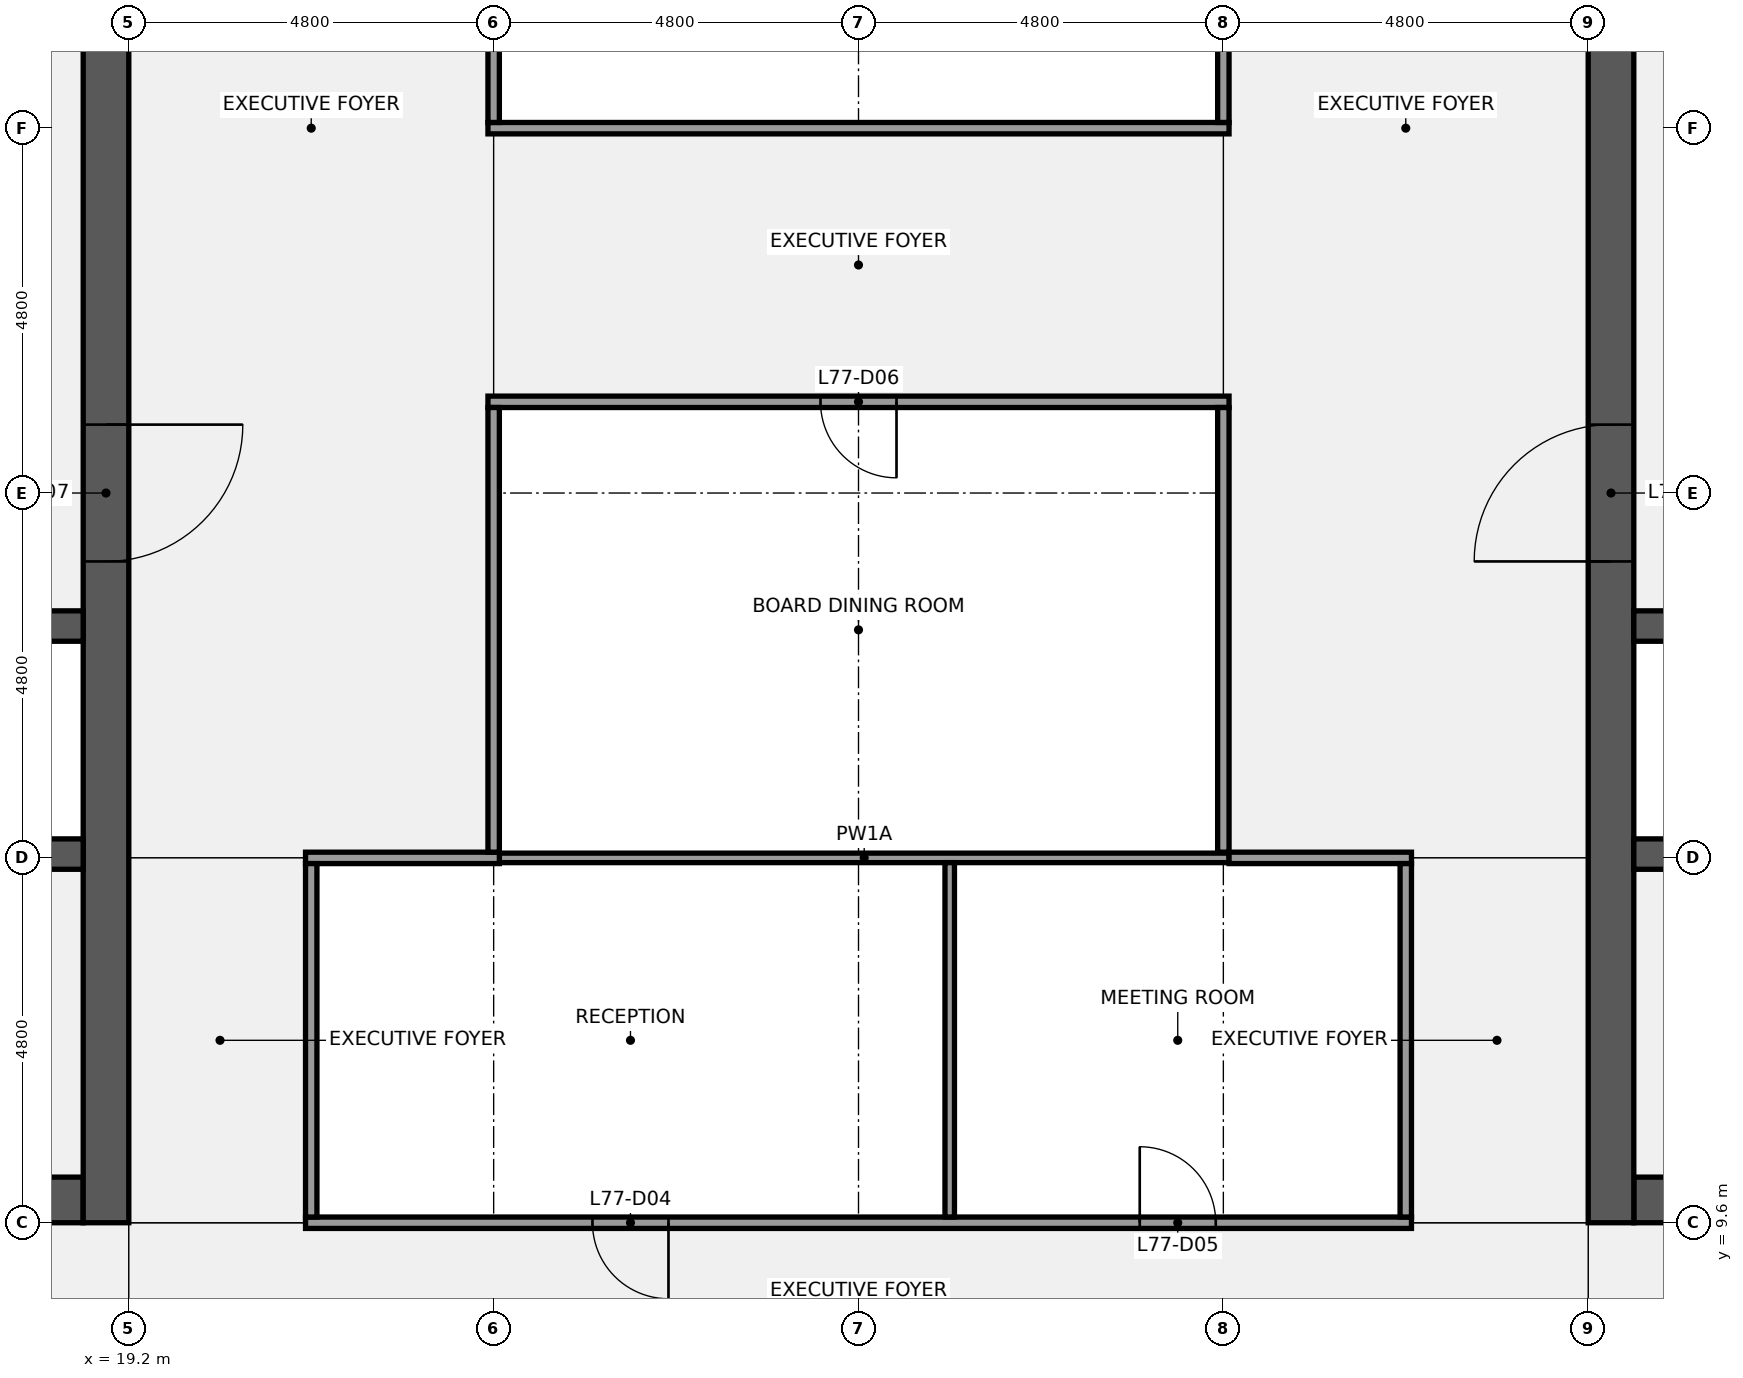
"""IFC4 building model, lengths in metres.
Left out: names, types, materials, properties, quantities, classifications, styles, units other than length and angle.
Written with IfcOpenShell. Run it as: python <this file> out.ifc"""

import sys

from ifc_helpers import new_model, si_unit, direction, frame, frame_2d, origin, place, context, subcontext, project, spatial, rectangle, extrude, element, fill, save


model = new_model("IFC4")
c1 = context("Model", 3, precision=1e-05, world=origin(), true_north=direction((0.0, 1.0)))
c2 = subcontext(c1, "Body", "Model", "MODEL_VIEW")
j1 = project(units=[si_unit("LENGTHUNIT", "METRE"), si_unit("PLANEANGLEUNIT", "RADIAN")], contexts=[c1])
p1 = place(None, origin())
s1 = spatial("IfcSite", under=j1, at=p1, CompositionType="ELEMENT")
p2 = place(p1, origin())
s2 = spatial("IfcBuilding", under=s1, at=p2, CompositionType="ELEMENT")
p3 = place(p2, frame((0.0, 0.0, 346.3)))
s3 = spatial("IfcBuildingStorey", under=s2, at=p3, CompositionType="ELEMENT", Elevation=346.3)
p4 = place(p3, frame((18.6, 9.9, 0.0), z_axis=(0.0, 0.0, 1.0), x_axis=(-1.0, 0.0, 0.0)))
e1 = element("IfcWall", 1, at=p4, inside=s3, PredefinedType="SHEAR", context=c2, shape_type="SweptSolid", body=[
    extrude(rectangle(XDim=4.2, YDim=0.6, at=frame_2d((2.1, 0.0))), origin(), (0.0, 0.0, 1.0), 3.84),
])
p5 = place(p4, frame((1.25, 0.0, 0.0)))
e2 = element("IfcOpeningElement", 2, at=p5, cuts=e1, PredefinedType="OPENING", context=c2, shape_type="SweptSolid", body=[
    extrude(rectangle(XDim=1.1, YDim=2.1, at=frame_2d((0.55, 1.05))), frame((0.0, 0.31, 0.0), z_axis=(0.0, -1.0, 0.0), x_axis=(1.0, 0.0, 0.0)), (0.0, 0.0, 1.0), 0.62),
])
p6 = place(p3, frame((18.9, 38.4, 0.0), z_axis=(0.0, 0.0, 1.0), x_axis=(0.0, -1.0, 0.0)))
e3 = element("IfcWall", 3, at=p6, inside=s3, PredefinedType="SHEAR", context=c2, shape_type="SweptSolid", body=[
    extrude(rectangle(XDim=28.8, YDim=0.6, at=frame_2d((14.4, 0.0))), origin(), (0.0, 0.0, 1.0), 3.84),
])
p7 = place(p6, frame((18.3, 0.0, 0.0)))
e4 = element("IfcOpeningElement", 4, at=p7, cuts=e3, PredefinedType="OPENING", context=c2, shape_type="SweptSolid", body=[
    extrude(rectangle(XDim=1.8, YDim=2.1, at=frame_2d((0.9, 1.05))), frame((0.0, 0.31, 0.0), z_axis=(0.0, -1.0, 0.0), x_axis=(1.0, 0.0, 0.0)), (0.0, 0.0, 1.0), 0.62),
])
p8 = place(p6, frame((8.7, 0.0, 0.0)))
e5 = element("IfcOpeningElement", 5, at=p8, cuts=e3, PredefinedType="OPENING", context=c2, shape_type="SweptSolid", body=[
    extrude(rectangle(XDim=1.8, YDim=2.1, at=frame_2d((0.9, 1.05))), frame((0.0, 0.31, 0.0), z_axis=(0.0, -1.0, 0.0), x_axis=(1.0, 0.0, 0.0)), (0.0, 0.0, 1.0), 0.62),
])
p9 = place(p3, frame((0.6, 14.45, 0.0), z_axis=(0.0, 0.0, 1.0), x_axis=(1.0, 0.0, 0.0)))
e6 = element("IfcWall", 6, at=p9, inside=s3, PredefinedType="SHEAR", context=c2, shape_type="SweptSolid", body=[
    extrude(rectangle(XDim=18.0, YDim=0.4, at=frame_2d((9.0, 0.0))), origin(), (0.0, 0.0, 1.0), 3.84),
])
p10 = place(p3, frame((0.6, 17.45, 0.0), z_axis=(0.0, 0.0, 1.0), x_axis=(1.0, 0.0, 0.0)))
e7 = element("IfcWall", 7, at=p10, inside=s3, PredefinedType="SHEAR", context=c2, shape_type="SweptSolid", body=[
    extrude(rectangle(XDim=18.0, YDim=0.4, at=frame_2d((9.0, 0.0))), origin(), (0.0, 0.0, 1.0), 3.84),
])
p11 = place(p10, frame((3.363, 0.0, 0.0)))
e8 = element("IfcOpeningElement", 8, at=p11, cuts=e7, PredefinedType="OPENING", context=c2, shape_type="SweptSolid", body=[
    extrude(rectangle(XDim=1.0, YDim=2.1, at=frame_2d((0.5, 1.05))), frame((0.0, 0.21, 0.0), z_axis=(0.0, -1.0, 0.0), x_axis=(1.0, 0.0, 0.0)), (0.0, 0.0, 1.0), 0.42),
])
p12 = place(p10, frame((9.1, 0.0, 0.0)))
e9 = element("IfcOpeningElement", 9, at=p12, cuts=e7, PredefinedType="OPENING", context=c2, shape_type="SweptSolid", body=[
    extrude(rectangle(XDim=1.0, YDim=2.1, at=frame_2d((0.5, 1.05))), frame((0.0, 0.21, 0.0), z_axis=(0.0, -1.0, 0.0), x_axis=(1.0, 0.0, 0.0)), (0.0, 0.0, 1.0), 0.42),
])
p13 = place(p10, frame((12.4, 0.0, 0.0)))
e10 = element("IfcOpeningElement", 10, at=p13, cuts=e7, PredefinedType="OPENING", context=c2, shape_type="SweptSolid", body=[
    extrude(rectangle(XDim=1.0, YDim=2.1, at=frame_2d((0.5, 1.05))), frame((0.0, 0.21, 0.0), z_axis=(0.0, -1.0, 0.0), x_axis=(1.0, 0.0, 0.0)), (0.0, 0.0, 1.0), 0.42),
])
p14 = place(p10, frame((15.738, 0.0, 0.0)))
e11 = element("IfcOpeningElement", 11, at=p14, cuts=e7, PredefinedType="OPENING", context=c2, shape_type="SweptSolid", body=[
    extrude(rectangle(XDim=1.0, YDim=2.1, at=frame_2d((0.5, 1.05))), frame((0.0, 0.21, 0.0), z_axis=(0.0, -1.0, 0.0), x_axis=(1.0, 0.0, 0.0)), (0.0, 0.0, 1.0), 0.42),
])
p15 = place(p3, frame((43.2, 9.9, 0.0), z_axis=(0.0, 0.0, 1.0), x_axis=(-1.0, 0.0, 0.0)))
e12 = element("IfcWall", 12, at=p15, inside=s3, PredefinedType="SHEAR", context=c2, shape_type="SweptSolid", body=[
    extrude(rectangle(XDim=4.2, YDim=0.6, at=frame_2d((2.1, 0.0))), origin(), (0.0, 0.0, 1.0), 3.84),
])
p16 = place(p15, frame((1.85, 0.0, 0.0)))
e13 = element("IfcOpeningElement", 13, at=p16, cuts=e12, PredefinedType="OPENING", context=c2, shape_type="SweptSolid", body=[
    extrude(rectangle(XDim=1.1, YDim=2.1, at=frame_2d((0.55, 1.05))), frame((0.0, 0.31, 0.0), z_axis=(0.0, -1.0, 0.0), x_axis=(1.0, 0.0, 0.0)), (0.0, 0.0, 1.0), 0.62),
])
p17 = place(p3, frame((38.7, 9.6, 0.0), z_axis=(0.0, 0.0, 1.0), x_axis=(0.0, 1.0, 0.0)))
e14 = element("IfcWall", 14, at=p17, inside=s3, PredefinedType="SHEAR", context=c2, shape_type="SweptSolid", body=[
    extrude(rectangle(XDim=28.8, YDim=0.6, at=frame_2d((14.4, 0.0))), origin(), (0.0, 0.0, 1.0), 3.84),
])
p18 = place(p17, frame((8.7, 0.0, 0.0)))
e15 = element("IfcOpeningElement", 15, at=p18, cuts=e14, PredefinedType="OPENING", context=c2, shape_type="SweptSolid", body=[
    extrude(rectangle(XDim=1.8, YDim=2.1, at=frame_2d((0.9, 1.05))), frame((0.0, 0.31, 0.0), z_axis=(0.0, -1.0, 0.0), x_axis=(1.0, 0.0, 0.0)), (0.0, 0.0, 1.0), 0.62),
])
p19 = place(p17, frame((18.3, 0.0, 0.0)))
e16 = element("IfcOpeningElement", 16, at=p19, cuts=e14, PredefinedType="OPENING", context=c2, shape_type="SweptSolid", body=[
    extrude(rectangle(XDim=1.8, YDim=2.1, at=frame_2d((0.9, 1.05))), frame((0.0, 0.31, 0.0), z_axis=(0.0, -1.0, 0.0), x_axis=(1.0, 0.0, 0.0)), (0.0, 0.0, 1.0), 0.62),
])
p20 = place(p3, frame((39.0, 14.45, 0.0), z_axis=(0.0, 0.0, 1.0), x_axis=(1.0, 0.0, 0.0)))
e17 = element("IfcWall", 17, at=p20, inside=s3, PredefinedType="SHEAR", context=c2, shape_type="SweptSolid", body=[
    extrude(rectangle(XDim=18.0, YDim=0.4, at=frame_2d((9.0, 0.0))), origin(), (0.0, 0.0, 1.0), 3.84),
])
p21 = place(p3, frame((39.0, 17.45, 0.0), z_axis=(0.0, 0.0, 1.0), x_axis=(1.0, 0.0, 0.0)))
e18 = element("IfcWall", 18, at=p21, inside=s3, PredefinedType="SHEAR", context=c2, shape_type="SweptSolid", body=[
    extrude(rectangle(XDim=18.0, YDim=0.4, at=frame_2d((9.0, 0.0))), origin(), (0.0, 0.0, 1.0), 3.84),
])
p22 = place(p21, frame((13.637, 0.0, 0.0)))
e19 = element("IfcOpeningElement", 19, at=p22, cuts=e18, PredefinedType="OPENING", context=c2, shape_type="SweptSolid", body=[
    extrude(rectangle(XDim=1.0, YDim=2.1, at=frame_2d((0.5, 1.05))), frame((0.0, 0.21, 0.0), z_axis=(0.0, -1.0, 0.0), x_axis=(1.0, 0.0, 0.0)), (0.0, 0.0, 1.0), 0.42),
])
p23 = place(p21, frame((7.9, 0.0, 0.0)))
e20 = element("IfcOpeningElement", 20, at=p23, cuts=e18, PredefinedType="OPENING", context=c2, shape_type="SweptSolid", body=[
    extrude(rectangle(XDim=1.0, YDim=2.1, at=frame_2d((0.5, 1.05))), frame((0.0, 0.21, 0.0), z_axis=(0.0, -1.0, 0.0), x_axis=(1.0, 0.0, 0.0)), (0.0, 0.0, 1.0), 0.42),
])
p24 = place(p21, frame((4.6, 0.0, 0.0)))
e21 = element("IfcOpeningElement", 21, at=p24, cuts=e18, PredefinedType="OPENING", context=c2, shape_type="SweptSolid", body=[
    extrude(rectangle(XDim=1.0, YDim=2.1, at=frame_2d((0.5, 1.05))), frame((0.0, 0.21, 0.0), z_axis=(0.0, -1.0, 0.0), x_axis=(1.0, 0.0, 0.0)), (0.0, 0.0, 1.0), 0.42),
])
p25 = place(p21, frame((1.262, 0.0, 0.0)))
e22 = element("IfcOpeningElement", 22, at=p25, cuts=e18, PredefinedType="OPENING", context=c2, shape_type="SweptSolid", body=[
    extrude(rectangle(XDim=1.0, YDim=2.1, at=frame_2d((0.5, 1.05))), frame((0.0, 0.21, 0.0), z_axis=(0.0, -1.0, 0.0), x_axis=(1.0, 0.0, 0.0)), (0.0, 0.0, 1.0), 0.42),
])
p26 = place(p3, frame((21.525, 9.6, 0.0), z_axis=(0.0, 0.0, 1.0), x_axis=(1.0, 0.0, 0.0)))
e23 = element("IfcWall", 23, at=p26, inside=s3, PredefinedType="PARTITIONING", context=c2, shape_type="SweptSolid", body=[
    extrude(rectangle(XDim=14.55, YDim=0.15, at=frame_2d((7.275, 0.0))), origin(), (0.0, 0.0, 1.0), 2.849),
])
p27 = place(p26, frame((3.775, 0.0, 0.0)))
e24 = element("IfcOpeningElement", 24, at=p27, cuts=e23, PredefinedType="OPENING", context=c2, shape_type="SweptSolid", body=[
    extrude(rectangle(XDim=1.0, YDim=2.1, at=frame_2d((0.5, 1.05))), frame((0.0, 0.085, 0.0), z_axis=(0.0, -1.0, 0.0), x_axis=(1.0, 0.0, 0.0)), (0.0, 0.0, 1.0), 0.17),
])
p28 = place(p26, frame((10.975, 0.0, 0.0)))
e25 = element("IfcOpeningElement", 25, at=p28, cuts=e23, PredefinedType="OPENING", context=c2, shape_type="SweptSolid", body=[
    extrude(rectangle(XDim=1.0, YDim=2.1, at=frame_2d((0.5, 1.05))), frame((0.0, 0.085, 0.0), z_axis=(0.0, -1.0, 0.0), x_axis=(1.0, 0.0, 0.0)), (0.0, 0.0, 1.0), 0.17),
])
p29 = place(p3, frame((24.075, 14.4, 0.0), z_axis=(0.0, 0.0, 1.0), x_axis=(1.0, 0.0, 0.0)))
e26 = element("IfcWall", 26, at=p29, inside=s3, PredefinedType="PARTITIONING", context=c2, shape_type="SweptSolid", body=[
    extrude(rectangle(XDim=9.6, YDim=0.125, at=frame_2d((4.8, 0.0))), origin(), (0.0, 0.0, 1.0), 2.849),
])
p30 = place(p3, frame((21.525, 14.4, 0.0), z_axis=(0.0, 0.0, 1.0), x_axis=(1.0, 0.0, 0.0)))
e27 = element("IfcWall", 27, at=p30, inside=s3, PredefinedType="PARTITIONING", context=c2, shape_type="SweptSolid", body=[
    extrude(rectangle(XDim=2.55, YDim=0.15, at=frame_2d((1.275, 0.0))), origin(), (0.0, 0.0, 1.0), 2.849),
])
p31 = place(p3, frame((33.675, 14.4, 0.0), z_axis=(0.0, 0.0, 1.0), x_axis=(1.0, 0.0, 0.0)))
e28 = element("IfcWall", 28, at=p31, inside=s3, PredefinedType="PARTITIONING", context=c2, shape_type="SweptSolid", body=[
    extrude(rectangle(XDim=2.4, YDim=0.15, at=frame_2d((1.2, 0.0))), origin(), (0.0, 0.0, 1.0), 2.849),
])
p32 = place(p3, frame((23.925, 20.4, 0.0), z_axis=(0.0, 0.0, 1.0), x_axis=(1.0, 0.0, 0.0)))
e29 = element("IfcWall", 29, at=p32, inside=s3, PredefinedType="PARTITIONING", context=c2, shape_type="SweptSolid", body=[
    extrude(rectangle(XDim=9.75, YDim=0.15, at=frame_2d((4.875, 0.0))), origin(), (0.0, 0.0, 1.0), 2.849),
])
p33 = place(p32, frame((4.375, 0.0, 0.0)))
e30 = element("IfcOpeningElement", 30, at=p33, cuts=e29, PredefinedType="OPENING", context=c2, shape_type="SweptSolid", body=[
    extrude(rectangle(XDim=1.0, YDim=2.1, at=frame_2d((0.5, 1.05))), frame((0.0, 0.085, 0.0), z_axis=(0.0, -1.0, 0.0), x_axis=(1.0, 0.0, 0.0)), (0.0, 0.0, 1.0), 0.17),
])
p34 = place(p3, frame((23.925, 24.0, 0.0), z_axis=(0.0, 0.0, 1.0), x_axis=(1.0, 0.0, 0.0)))
e31 = element("IfcWall", 31, at=p34, inside=s3, PredefinedType="PARTITIONING", context=c2, shape_type="SweptSolid", body=[
    extrude(rectangle(XDim=9.75, YDim=0.15, at=frame_2d((4.875, 0.0))), origin(), (0.0, 0.0, 1.0), 2.849),
])
p35 = place(p3, frame((21.6, 9.675, 0.0), z_axis=(0.0, 0.0, 1.0), x_axis=(0.0, 1.0, 0.0)))
e32 = element("IfcWall", 32, at=p35, inside=s3, PredefinedType="PARTITIONING", context=c2, shape_type="SweptSolid", body=[
    extrude(rectangle(XDim=4.65, YDim=0.15, at=frame_2d((2.325, 0.0))), origin(), (0.0, 0.0, 1.0), 2.849),
])
p36 = place(p3, frame((24.0, 14.475, 0.0), z_axis=(0.0, 0.0, 1.0), x_axis=(0.0, 1.0, 0.0)))
e33 = element("IfcWall", 33, at=p36, inside=s3, PredefinedType="PARTITIONING", context=c2, shape_type="SweptSolid", body=[
    extrude(rectangle(XDim=5.85, YDim=0.15, at=frame_2d((2.925, 0.0))), origin(), (0.0, 0.0, 1.0), 2.849),
])
p37 = place(p3, frame((24.0, 24.075, 0.0), z_axis=(0.0, 0.0, 1.0), x_axis=(0.0, 1.0, 0.0)))
e34 = element("IfcWall", 34, at=p37, inside=s3, PredefinedType="PARTITIONING", context=c2, shape_type="SweptSolid", body=[
    extrude(rectangle(XDim=9.45, YDim=0.15, at=frame_2d((4.725, 0.0))), origin(), (0.0, 0.0, 1.0), 2.849),
])
p38 = place(p37, frame((4.225, 0.0, 0.0)))
e35 = element("IfcOpeningElement", 35, at=p38, cuts=e34, PredefinedType="OPENING", context=c2, shape_type="SweptSolid", body=[
    extrude(rectangle(XDim=1.0, YDim=2.1, at=frame_2d((0.5, 1.05))), frame((0.0, 0.085, 0.0), z_axis=(0.0, -1.0, 0.0), x_axis=(1.0, 0.0, 0.0)), (0.0, 0.0, 1.0), 0.17),
])
p39 = place(p3, frame((30.0, 9.675, 0.0), z_axis=(0.0, 0.0, 1.0), x_axis=(0.0, 1.0, 0.0)))
e36 = element("IfcWall", 36, at=p39, inside=s3, PredefinedType="PARTITIONING", context=c2, shape_type="SweptSolid", body=[
    extrude(rectangle(XDim=4.662, YDim=0.125, at=frame_2d((2.331, 0.0))), origin(), (0.0, 0.0, 1.0), 2.849),
])
p40 = place(p3, frame((33.6, 14.475, 0.0), z_axis=(0.0, 0.0, 1.0), x_axis=(0.0, 1.0, 0.0)))
e37 = element("IfcWall", 37, at=p40, inside=s3, PredefinedType="PARTITIONING", context=c2, shape_type="SweptSolid", body=[
    extrude(rectangle(XDim=5.85, YDim=0.15, at=frame_2d((2.925, 0.0))), origin(), (0.0, 0.0, 1.0), 2.849),
])
p41 = place(p3, frame((33.6, 24.075, 0.0), z_axis=(0.0, 0.0, 1.0), x_axis=(0.0, 1.0, 0.0)))
e38 = element("IfcWall", 38, at=p41, inside=s3, PredefinedType="PARTITIONING", context=c2, shape_type="SweptSolid", body=[
    extrude(rectangle(XDim=9.45, YDim=0.15, at=frame_2d((4.725, 0.0))), origin(), (0.0, 0.0, 1.0), 2.849),
])
p42 = place(p3, frame((36.0, 9.675, 0.0), z_axis=(0.0, 0.0, 1.0), x_axis=(0.0, 1.0, 0.0)))
e39 = element("IfcWall", 39, at=p42, inside=s3, PredefinedType="PARTITIONING", context=c2, shape_type="SweptSolid", body=[
    extrude(rectangle(XDim=4.65, YDim=0.15, at=frame_2d((2.325, 0.0))), origin(), (0.0, 0.0, 1.0), 2.849),
])
p43 = place(p7, origin())
e40 = element("IfcDoor", 40, at=p43, inside=s3, OperationType="DOUBLE_DOOR_SINGLE_SWING", PredefinedType="DOOR", context=c2, shape_type="SweptSolid", body=[
    extrude(rectangle(XDim=1.8, YDim=2.1, at=frame_2d((0.9, 1.05))), frame((0.0, 0.025, 0.0), z_axis=(0.0, -1.0, 0.0), x_axis=(1.0, 0.0, 0.0)), (0.0, 0.0, 1.0), 0.05),
])
fill(e4, e40)
p44 = place(p18, origin())
e41 = element("IfcDoor", 41, at=p44, inside=s3, OperationType="DOUBLE_DOOR_SINGLE_SWING", PredefinedType="DOOR", context=c2, shape_type="SweptSolid", body=[
    extrude(rectangle(XDim=1.8, YDim=2.1, at=frame_2d((0.9, 1.05))), frame((0.0, 0.025, 0.0), z_axis=(0.0, -1.0, 0.0), x_axis=(1.0, 0.0, 0.0)), (0.0, 0.0, 1.0), 0.05),
])
fill(e15, e41)
p45 = place(p27, origin())
e42 = element("IfcDoor", 42, at=p45, inside=s3, OperationType="SINGLE_SWING_RIGHT", PredefinedType="DOOR", context=c2, shape_type="SweptSolid", body=[
    extrude(rectangle(XDim=1.0, YDim=2.1, at=frame_2d((0.5, 1.05))), frame((0.0, 0.025, 0.0), z_axis=(0.0, -1.0, 0.0), x_axis=(1.0, 0.0, 0.0)), (0.0, 0.0, 1.0), 0.05),
])
fill(e24, e42)
p46 = place(p28, origin())
e43 = element("IfcDoor", 43, at=p46, inside=s3, OperationType="SINGLE_SWING_LEFT", PredefinedType="DOOR", context=c2, shape_type="SweptSolid", body=[
    extrude(rectangle(XDim=1.0, YDim=2.1, at=frame_2d((0.5, 1.05))), frame((0.0, 0.025, 0.0), z_axis=(0.0, -1.0, 0.0), x_axis=(1.0, 0.0, 0.0)), (0.0, 0.0, 1.0), 0.05),
])
fill(e25, e43)
p47 = place(p33, origin())
e44 = element("IfcDoor", 44, at=p47, inside=s3, OperationType="SINGLE_SWING_RIGHT", PredefinedType="DOOR", context=c2, shape_type="SweptSolid", body=[
    extrude(rectangle(XDim=1.0, YDim=2.1, at=frame_2d((0.5, 1.05))), frame((0.0, 0.025, 0.0), z_axis=(0.0, -1.0, 0.0), x_axis=(1.0, 0.0, 0.0)), (0.0, 0.0, 1.0), 0.05),
])
fill(e30, e44)
save(model, sys.argv[1])
